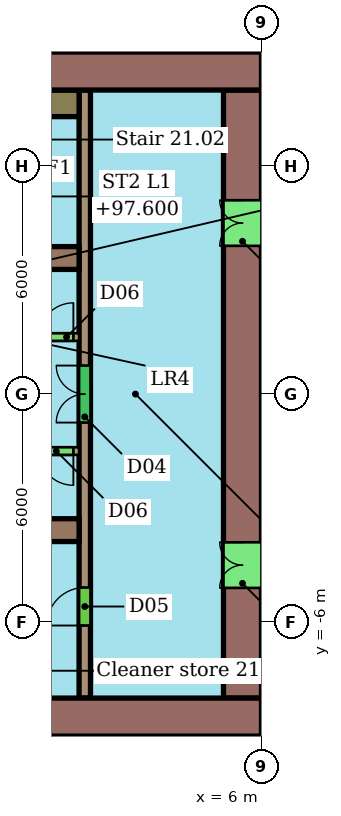
"""IFC4 building model, lengths in metres.
Left out: names, types, materials, properties, quantities, classifications, styles, units other than length and angle.
Written with IfcOpenShell. Run it as: python <this file> out.ifc"""

import sys

from ifc_helpers import new_model, si_unit, direction, frame, frame_2d, origin, place, context, subcontext, project, spatial, rectangle, extrude, element, fill, save


model = new_model("IFC4")
c1 = context("Model", 3, precision=1e-05, world=origin(), true_north=direction((0.0, 1.0)))
c2 = subcontext(c1, "Body", "Model", "MODEL_VIEW")
j1 = project(units=[si_unit("LENGTHUNIT", "METRE"), si_unit("PLANEANGLEUNIT", "RADIAN")], contexts=[c1])
p1 = place(None, origin())
s1 = spatial("IfcSite", under=j1, at=p1, CompositionType="ELEMENT")
p2 = place(p1, origin())
s2 = spatial("IfcBuilding", under=s1, at=p2, CompositionType="ELEMENT")
p3 = place(p2, frame((0.0, 0.0, 95.8)))
s3 = spatial("IfcBuildingStorey", under=s2, at=p3, CompositionType="ELEMENT", Elevation=95.8)
p4 = place(p3, frame((6.0, 8.5, 0.0), z_axis=(0.0, 0.0, 1.0), x_axis=(-1.0, 0.0, 0.0)))
e1 = element("IfcWall", 1, at=p4, inside=s3, PredefinedType="SHEAR", context=c2, shape_type="SweptSolid", body=[
    extrude(rectangle(XDim=12.0, YDim=1.0, at=frame_2d((6.0, 0.0))), origin(), (0.0, 0.0, 1.0), 3.3),
])
p5 = place(p4, frame((5.6, 0.0, 0.0)))
e2 = element("IfcOpeningElement", 2, at=p5, cuts=e1, PredefinedType="OPENING", context=c2, shape_type="SweptSolid", body=[
    extrude(rectangle(XDim=1.2, YDim=2.1, at=frame_2d((0.6, 1.05))), frame((0.0, 0.51, 0.0), z_axis=(0.0, -1.0, 0.0), x_axis=(1.0, 0.0, 0.0)), (0.0, 0.0, 1.0), 1.02),
])
p6 = place(p3, frame((-18.0, -8.5, 0.0), z_axis=(0.0, 0.0, 1.0), x_axis=(1.0, 0.0, 0.0)))
e3 = element("IfcWall", 3, at=p6, inside=s3, PredefinedType="SHEAR", context=c2, shape_type="SweptSolid", body=[
    extrude(rectangle(XDim=24.0, YDim=1.0, at=frame_2d((12.0, 0.0))), origin(), (0.0, 0.0, 1.0), 3.3),
])
p7 = place(p6, frame((6.0, 0.0, 0.0)))
e4 = element("IfcOpeningElement", 4, at=p7, cuts=e3, PredefinedType="OPENING", context=c2, shape_type="SweptSolid", body=[
    extrude(rectangle(XDim=1.2, YDim=2.1, at=frame_2d((0.6, 1.05))), frame((0.0, 0.51, 0.0), z_axis=(0.0, -1.0, 0.0), x_axis=(1.0, 0.0, 0.0)), (0.0, 0.0, 1.0), 1.02),
])
p8 = place(p3, frame((5.5, -8.0, 0.0), z_axis=(0.0, 0.0, 1.0), x_axis=(0.0, 1.0, 0.0)))
e5 = element("IfcWall", 5, at=p8, inside=s3, PredefinedType="SHEAR", context=c2, shape_type="SweptSolid", body=[
    extrude(rectangle(XDim=16.0, YDim=1.0, at=frame_2d((8.0, 0.0))), origin(), (0.0, 0.0, 1.0), 3.3),
])
p9 = place(p8, frame((2.9, 0.0, 0.0)))
e6 = element("IfcOpeningElement", 6, at=p9, cuts=e5, PredefinedType="OPENING", context=c2, shape_type="SweptSolid", body=[
    extrude(rectangle(XDim=1.2, YDim=2.1, at=frame_2d((0.6, 1.05))), frame((0.0, 0.51, 0.0), z_axis=(0.0, -1.0, 0.0), x_axis=(1.0, 0.0, 0.0)), (0.0, 0.0, 1.0), 1.02),
])
p10 = place(p8, frame((11.9, 0.0, 0.0)))
e7 = element("IfcOpeningElement", 7, at=p10, cuts=e5, PredefinedType="OPENING", context=c2, shape_type="SweptSolid", body=[
    extrude(rectangle(XDim=1.2, YDim=2.1, at=frame_2d((0.6, 1.05))), frame((0.0, 0.51, 0.0), z_axis=(0.0, -1.0, 0.0), x_axis=(1.0, 0.0, 0.0)), (0.0, 0.0, 1.0), 1.02),
])
for number, where, z_axis, x_axis in (
    (8, (-6.0, 3.58, 0.0), (0.0, 0.0, 1.0), (1.0, 0.0, 0.0)),
    (9, (-6.0, -3.58, 0.0), (0.0, 0.0, 1.0), (1.0, 0.0, 0.0)),
):
    element("IfcWall", number, at=place(p3, frame(where, z_axis=z_axis, x_axis=x_axis)), inside=s3, PredefinedType="SHEAR", context=c2, shape_type="SweptSolid", body=[
        extrude(rectangle(XDim=7.2, YDim=0.6, at=frame_2d((3.6, 0.0))), origin(), (0.0, 0.0, 1.0), 3.3),
    ])
p11 = place(p3, frame((1.35, -8.0, 0.0), z_axis=(0.0, 0.0, 1.0), x_axis=(0.0, 1.0, 0.0)))
e10 = element("IfcWall", 10, at=p11, inside=s3, PredefinedType="SHEAR", context=c2, shape_type="SweptSolid", body=[
    extrude(rectangle(XDim=16.0, YDim=0.3, at=frame_2d((8.0, 0.0))), origin(), (0.0, 0.0, 1.0), 3.3),
])
p12 = place(p11, frame((1.91, 0.0, 0.0)))
e11 = element("IfcOpeningElement", 11, at=p12, cuts=e10, PredefinedType="OPENING", context=c2, shape_type="SweptSolid", body=[
    extrude(rectangle(XDim=1.0, YDim=2.1, at=frame_2d((0.5, 1.05))), frame((0.0, 0.16, 0.0), z_axis=(0.0, -1.0, 0.0), x_axis=(1.0, 0.0, 0.0)), (0.0, 0.0, 1.0), 0.32),
])
p13 = place(p11, frame((7.25, 0.0, 0.0)))
e12 = element("IfcOpeningElement", 12, at=p13, cuts=e10, PredefinedType="OPENING", context=c2, shape_type="SweptSolid", body=[
    extrude(rectangle(XDim=1.5, YDim=2.1, at=frame_2d((0.75, 1.05))), frame((0.0, 0.16, 0.0), z_axis=(0.0, -1.0, 0.0), x_axis=(1.0, 0.0, 0.0)), (0.0, 0.0, 1.0), 0.32),
])
p14 = place(p3, frame((-13.2, 1.5, 0.0), z_axis=(0.0, 0.0, 1.0), x_axis=(1.0, 0.0, 0.0)))
e13 = element("IfcWall", 13, at=p14, inside=s3, PredefinedType="SHEAR", context=c2, shape_type="SweptSolid", body=[
    extrude(rectangle(XDim=14.4, YDim=0.2, at=frame_2d((7.2, 0.0))), origin(), (0.0, 0.0, 1.0), 3.3),
])
p15 = place(p14, frame((0.546, 0.0, 0.0)))
e14 = element("IfcOpeningElement", 14, at=p15, cuts=e13, PredefinedType="OPENING", context=c2, shape_type="SweptSolid", body=[
    extrude(rectangle(XDim=1.1, YDim=2.1, at=frame_2d((0.55, 1.05))), frame((0.0, 0.11, 0.0), z_axis=(0.0, -1.0, 0.0), x_axis=(1.0, 0.0, 0.0)), (0.0, 0.0, 1.0), 0.22),
])
p16 = place(p14, frame((2.988, 0.0, 0.0)))
e15 = element("IfcOpeningElement", 15, at=p16, cuts=e13, PredefinedType="OPENING", context=c2, shape_type="SweptSolid", body=[
    extrude(rectangle(XDim=1.1, YDim=2.1, at=frame_2d((0.55, 1.05))), frame((0.0, 0.11, 0.0), z_axis=(0.0, -1.0, 0.0), x_axis=(1.0, 0.0, 0.0)), (0.0, 0.0, 1.0), 0.22),
])
p17 = place(p14, frame((5.429, 0.0, 0.0)))
e16 = element("IfcOpeningElement", 16, at=p17, cuts=e13, PredefinedType="OPENING", context=c2, shape_type="SweptSolid", body=[
    extrude(rectangle(XDim=1.1, YDim=2.1, at=frame_2d((0.55, 1.05))), frame((0.0, 0.11, 0.0), z_axis=(0.0, -1.0, 0.0), x_axis=(1.0, 0.0, 0.0)), (0.0, 0.0, 1.0), 0.22),
])
p18 = place(p14, frame((7.871, 0.0, 0.0)))
e17 = element("IfcOpeningElement", 17, at=p18, cuts=e13, PredefinedType="OPENING", context=c2, shape_type="SweptSolid", body=[
    extrude(rectangle(XDim=1.1, YDim=2.1, at=frame_2d((0.55, 1.05))), frame((0.0, 0.11, 0.0), z_axis=(0.0, -1.0, 0.0), x_axis=(1.0, 0.0, 0.0)), (0.0, 0.0, 1.0), 0.22),
])
p19 = place(p14, frame((10.21, 0.0, 0.0)))
e18 = element("IfcOpeningElement", 18, at=p19, cuts=e13, PredefinedType="OPENING", context=c2, shape_type="SweptSolid", body=[
    extrude(rectangle(XDim=1.0, YDim=2.1, at=frame_2d((0.5, 1.05))), frame((0.0, 0.11, 0.0), z_axis=(0.0, -1.0, 0.0), x_axis=(1.0, 0.0, 0.0)), (0.0, 0.0, 1.0), 0.22),
])
p20 = place(p14, frame((13.35, 0.0, 0.0)))
e19 = element("IfcOpeningElement", 19, at=p20, cuts=e13, PredefinedType="OPENING", context=c2, shape_type="SweptSolid", body=[
    extrude(rectangle(XDim=0.9, YDim=2.1, at=frame_2d((0.45, 1.05))), frame((0.0, 0.11, 0.0), z_axis=(0.0, -1.0, 0.0), x_axis=(1.0, 0.0, 0.0)), (0.0, 0.0, 1.0), 0.22),
])
p21 = place(p3, frame((1.2, -1.5, 0.0), z_axis=(0.0, 0.0, 1.0), x_axis=(-1.0, 0.0, 0.0)))
e20 = element("IfcWall", 20, at=p21, inside=s3, PredefinedType="SHEAR", context=c2, shape_type="SweptSolid", body=[
    extrude(rectangle(XDim=14.4, YDim=0.2, at=frame_2d((7.2, 0.0))), origin(), (0.0, 0.0, 1.0), 3.3),
])
p22 = place(p21, frame((7.821, 0.0, 0.0)))
e21 = element("IfcOpeningElement", 21, at=p22, cuts=e20, PredefinedType="OPENING", context=c2, shape_type="SweptSolid", body=[
    extrude(rectangle(XDim=1.2, YDim=2.1, at=frame_2d((0.6, 1.05))), frame((0.0, 0.11, 0.0), z_axis=(0.0, -1.0, 0.0), x_axis=(1.0, 0.0, 0.0)), (0.0, 0.0, 1.0), 0.22),
])
p23 = place(p21, frame((0.15, 0.0, 0.0)))
e22 = element("IfcOpeningElement", 22, at=p23, cuts=e20, PredefinedType="OPENING", context=c2, shape_type="SweptSolid", body=[
    extrude(rectangle(XDim=0.9, YDim=2.1, at=frame_2d((0.45, 1.05))), frame((0.0, 0.11, 0.0), z_axis=(0.0, -1.0, 0.0), x_axis=(1.0, 0.0, 0.0)), (0.0, 0.0, 1.0), 0.22),
])
p24 = place(p3, frame((0.4, 7.65, 0.0), z_axis=(0.0, 0.0, 1.0), x_axis=(1.0, 0.0, 0.0)))
e23 = element("IfcWall", 23, at=p24, inside=s3, PredefinedType="SHEAR", context=c2, shape_type="SweptSolid", body=[
    extrude(rectangle(XDim=0.8, YDim=0.7, at=frame_2d((0.4, 0.0))), origin(), (0.0, 0.0, 1.0), 3.3),
])
p25 = place(p9, origin())
e24 = element("IfcDoor", 24, at=p25, inside=s3, OperationType="DOUBLE_DOOR_SINGLE_SWING", PredefinedType="NOTDEFINED", context=c2, shape_type="SweptSolid", body=[
    extrude(rectangle(XDim=1.2, YDim=2.1, at=frame_2d((0.6, 1.05))), frame((0.0, 0.025, 0.0), z_axis=(0.0, -1.0, 0.0), x_axis=(1.0, 0.0, 0.0)), (0.0, 0.0, 1.0), 0.05),
])
fill(e6, e24)
p26 = place(p10, origin())
e25 = element("IfcDoor", 25, at=p26, inside=s3, OperationType="DOUBLE_DOOR_SINGLE_SWING", PredefinedType="NOTDEFINED", context=c2, shape_type="SweptSolid", body=[
    extrude(rectangle(XDim=1.2, YDim=2.1, at=frame_2d((0.6, 1.05))), frame((0.0, 0.025, 0.0), z_axis=(0.0, -1.0, 0.0), x_axis=(1.0, 0.0, 0.0)), (0.0, 0.0, 1.0), 0.05),
])
fill(e7, e25)
p27 = place(p12, origin())
e26 = element("IfcDoor", 26, at=p27, inside=s3, OperationType="SINGLE_SWING_LEFT", PredefinedType="NOTDEFINED", context=c2, shape_type="SweptSolid", body=[
    extrude(rectangle(XDim=1.0, YDim=2.1, at=frame_2d((0.5, 1.05))), frame((0.0, 0.025, 0.0), z_axis=(0.0, -1.0, 0.0), x_axis=(1.0, 0.0, 0.0)), (0.0, 0.0, 1.0), 0.05),
])
fill(e11, e26)
p28 = place(p13, origin())
e27 = element("IfcDoor", 27, at=p28, inside=s3, OperationType="DOUBLE_DOOR_SINGLE_SWING", PredefinedType="NOTDEFINED", context=c2, shape_type="SweptSolid", body=[
    extrude(rectangle(XDim=1.5, YDim=2.1, at=frame_2d((0.75, 1.05))), frame((0.0, 0.025, 0.0), z_axis=(0.0, -1.0, 0.0), x_axis=(1.0, 0.0, 0.0)), (0.0, 0.0, 1.0), 0.05),
])
fill(e12, e27)
p29 = place(p20, origin())
e28 = element("IfcDoor", 28, at=p29, inside=s3, OperationType="SINGLE_SWING_RIGHT", PredefinedType="NOTDEFINED", context=c2, shape_type="SweptSolid", body=[
    extrude(rectangle(XDim=0.9, YDim=2.1, at=frame_2d((0.45, 1.05))), frame((0.0, 0.025, 0.0), z_axis=(0.0, -1.0, 0.0), x_axis=(1.0, 0.0, 0.0)), (0.0, 0.0, 1.0), 0.05),
])
fill(e19, e28)
p30 = place(p23, origin())
e29 = element("IfcDoor", 29, at=p30, inside=s3, OperationType="SINGLE_SWING_LEFT", PredefinedType="NOTDEFINED", context=c2, shape_type="SweptSolid", body=[
    extrude(rectangle(XDim=0.9, YDim=2.1, at=frame_2d((0.45, 1.05))), frame((0.0, 0.025, 0.0), z_axis=(0.0, -1.0, 0.0), x_axis=(1.0, 0.0, 0.0)), (0.0, 0.0, 1.0), 0.05),
])
fill(e22, e29)
save(model, sys.argv[1])
